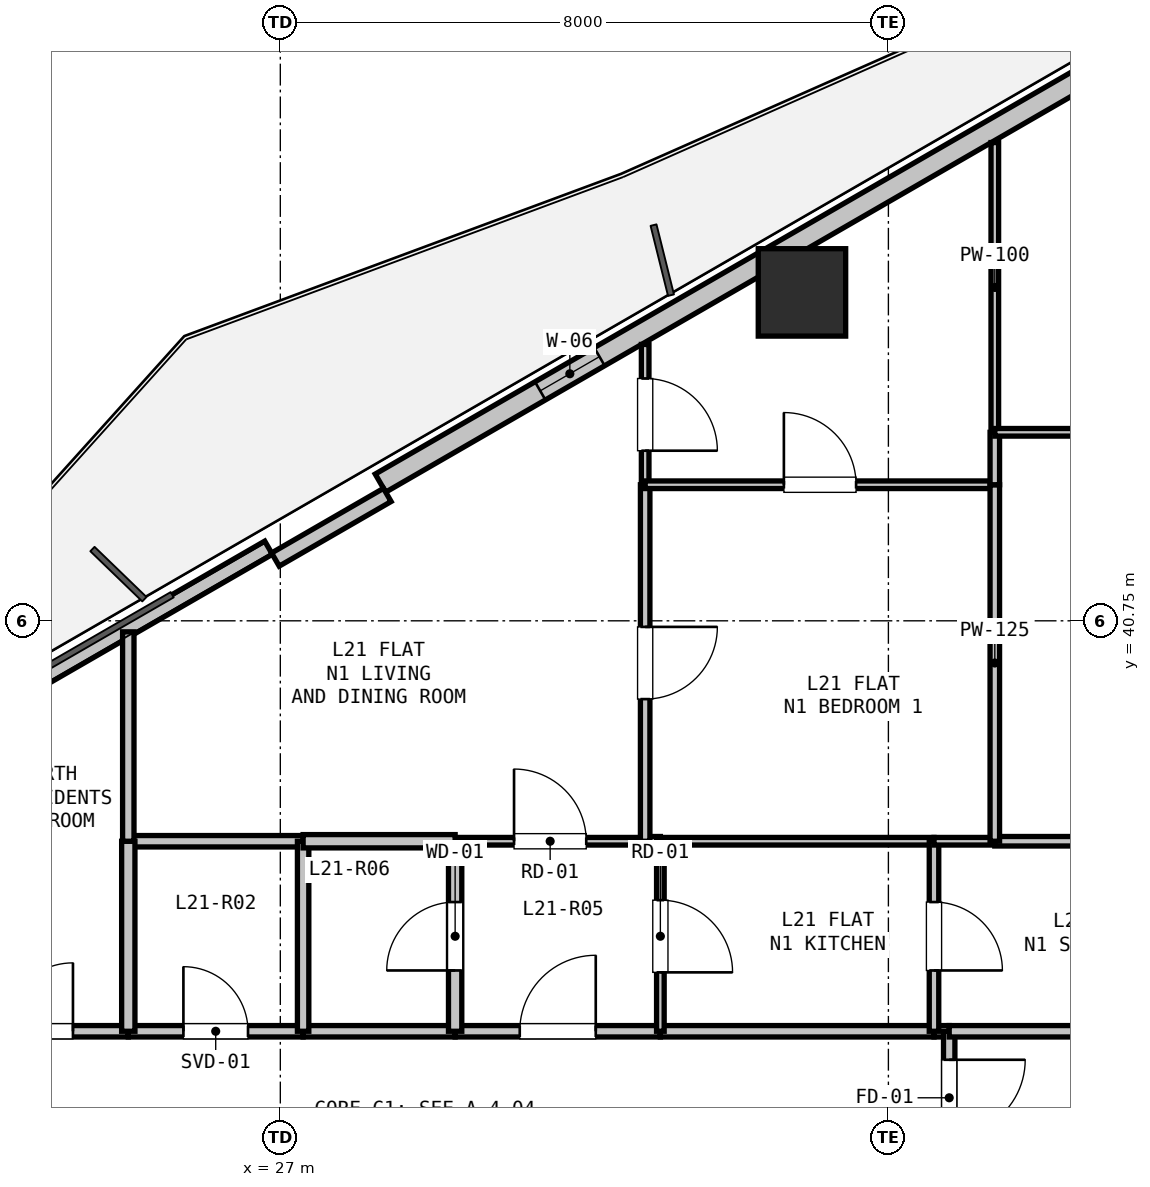
"""IFC4 building model, lengths in metres.
Left out: names, types, materials, properties, quantities, classifications, styles, units other than length and angle.
Written with IfcOpenShell. Run it as: python <this file> out.ifc"""

import sys

from ifc_helpers import new_model, si_unit, direction, frame, frame_2d, origin, origin_2d, place, context, subcontext, project, spatial, rectangle, hollow_rectangle, extrude, element, fill, save


model = new_model("IFC4")
c1 = context("Model", 3, precision=1e-05, world=origin(), true_north=direction((0.0, 1.0)))
c2 = subcontext(c1, "Body", "Model", "MODEL_VIEW")
j1 = project(units=[si_unit("LENGTHUNIT", "METRE"), si_unit("PLANEANGLEUNIT", "RADIAN")], contexts=[c1])
p1 = place(None, origin())
s1 = spatial("IfcSite", under=j1, at=p1, CompositionType="ELEMENT")
p2 = place(p1, origin())
s2 = spatial("IfcBuilding", under=s1, at=p2, CompositionType="ELEMENT")
p3 = place(p2, frame((0.0, 0.0, 80.1)))
s3 = spatial("IfcBuildingStorey", under=s2, at=p3, CompositionType="ELEMENT", Elevation=80.1)
p4 = place(p3, frame((33.863, 45.071, 0.0), z_axis=(0.0, 0.0, 1.0), x_axis=(1.0, 0.0, 0.0)))
e1 = element("IfcColumn", 1, at=p4, inside=s3, PredefinedType="COLUMN", context=c2, shape_type="SweptSolid", body=[
    extrude(hollow_rectangle(XDim=1.15, YDim=1.15, WallThickness=0.032, at=origin_2d()), origin(), (0.0, 0.0, 1.0), 3.3),
])
p5 = place(p3, frame((17.12, 36.097, 0.0), z_axis=(0.0, 0.0, 1.0), x_axis=(0.866027010039, 0.499997217876, 0.0)))
e2 = element("IfcWall", 2, at=p5, inside=s3, PredefinedType="PARAPET", context=c2, shape_type="SweptSolid", body=[
    extrude(rectangle(XDim=11.229, YDim=0.2, at=frame_2d((5.615, 0.0))), origin(), (0.0, 0.0, 1.0), 0.2),
])
p6 = place(p3, frame((28.317, 42.562, 0.0), z_axis=(0.0, 0.0, 1.0), x_axis=(0.866023023012, 0.500004123596, 0.0)))
e3 = element("IfcWall", 3, at=p6, inside=s3, PredefinedType="SOLIDWALL", context=c2, shape_type="SweptSolid", body=[
    extrude(rectangle(XDim=11.93, YDim=0.275, at=frame_2d((5.965, 0.0))), origin(), (0.0, 0.0, 1.0), 2.67),
])
p7 = place(p6, frame((2.427, 0.0, 0.9)))
e4 = element("IfcOpeningElement", 4, at=p7, cuts=e3, PredefinedType="OPENING", context=c2, shape_type="SweptSolid", body=[
    extrude(rectangle(XDim=0.9, YDim=1.4, at=frame_2d((0.45, 0.7))), frame((0.0, 0.147, 0.0), z_axis=(0.0, -1.0, 0.0), x_axis=(1.0, 0.0, 0.0)), (0.0, 0.0, 1.0), 0.295),
])
p8 = place(p3, frame((26.935, 41.556, 0.0), z_axis=(0.0, 0.0, 1.0), x_axis=(0.86605165483, 0.499954529098, 0.0)))
e5 = element("IfcWall", 5, at=p8, inside=s3, PredefinedType="PARAPET", context=c2, shape_type="SweptSolid", body=[
    extrude(rectangle(XDim=1.7, YDim=0.2, at=frame_2d((0.85, 0.0))), origin(), (0.0, 0.0, 1.0), 2.67),
])
p9 = place(p3, frame((19.8, 35.35, 0.0), z_axis=(0.0, 0.0, 1.0), x_axis=(1.0, 0.0, 0.0)))
e6 = element("IfcWall", 6, at=p9, inside=s3, PredefinedType="PARTITIONING", context=c2, shape_type="SweptSolid", body=[
    extrude(rectangle(XDim=5.2, YDim=0.15, at=frame_2d((2.6, 0.0))), origin(), (0.0, 0.0, 1.0), 3.05),
])
p10 = place(p9, frame((2.672, 0.0, 0.0)))
e7 = element("IfcOpeningElement", 7, at=p10, cuts=e6, PredefinedType="OPENING", context=c2, shape_type="SweptSolid", body=[
    extrude(rectangle(XDim=1.8, YDim=2.2, at=frame_2d((0.9, 1.1))), frame((0.0, 0.085, 0.0), z_axis=(0.0, -1.0, 0.0), x_axis=(1.0, 0.0, 0.0)), (0.0, 0.0, 1.0), 0.17),
])
p11 = place(p3, frame((25.0, 35.35, 0.0), z_axis=(0.0, 0.0, 1.0), x_axis=(1.0, 0.0, 0.0)))
e8 = element("IfcWall", 8, at=p11, inside=s3, PredefinedType="PARTITIONING", context=c2, shape_type="SweptSolid", body=[
    extrude(rectangle(XDim=2.3, YDim=0.15, at=frame_2d((1.15, 0.0))), origin(), (0.0, 0.0, 1.0), 3.05),
])
p12 = place(p11, frame((0.725, 0.0, 0.0)))
e9 = element("IfcOpeningElement", 9, at=p12, cuts=e8, PredefinedType="OPENING", context=c2, shape_type="SweptSolid", body=[
    extrude(rectangle(XDim=0.85, YDim=2.1, at=frame_2d((0.425, 1.05))), frame((0.0, 0.085, 0.0), z_axis=(0.0, -1.0, 0.0), x_axis=(1.0, 0.0, 0.0)), (0.0, 0.0, 1.0), 0.17),
])
p13 = place(p3, frame((27.3, 35.35, 0.0), z_axis=(0.0, 0.0, 1.0), x_axis=(1.0, 0.0, 0.0)))
e10 = element("IfcWall", 10, at=p13, inside=s3, PredefinedType="PARTITIONING", context=c2, shape_type="SweptSolid", body=[
    extrude(rectangle(XDim=2.0, YDim=0.15, at=frame_2d((1.0, 0.0))), origin(), (0.0, 0.0, 1.0), 3.05),
])
p14 = place(p3, frame((29.3, 35.35, 0.0), z_axis=(0.0, 0.0, 1.0), x_axis=(1.0, 0.0, 0.0)))
e11 = element("IfcWall", 11, at=p14, inside=s3, PredefinedType="PARTITIONING", context=c2, shape_type="SweptSolid", body=[
    extrude(rectangle(XDim=2.7, YDim=0.15, at=frame_2d((1.35, 0.0))), origin(), (0.0, 0.0, 1.0), 3.05),
])
p15 = place(p14, frame((0.85, 0.0, 0.0)))
e12 = element("IfcOpeningElement", 12, at=p15, cuts=e11, PredefinedType="OPENING", context=c2, shape_type="SweptSolid", body=[
    extrude(rectangle(XDim=1.0, YDim=2.15, at=frame_2d((0.5, 1.075))), frame((0.0, 0.085, 0.0), z_axis=(0.0, -1.0, 0.0), x_axis=(1.0, 0.0, 0.0)), (0.0, 0.0, 1.0), 0.17),
])
p16 = place(p3, frame((32.0, 35.35, 0.0), z_axis=(0.0, 0.0, 1.0), x_axis=(1.0, 0.0, 0.0)))
e13 = element("IfcWall", 13, at=p16, inside=s3, PredefinedType="PARTITIONING", context=c2, shape_type="SweptSolid", body=[
    extrude(rectangle(XDim=3.6, YDim=0.15, at=frame_2d((1.8, 0.0))), origin(), (0.0, 0.0, 1.0), 3.05),
])
p17 = place(p3, frame((35.6, 35.35, 0.0), z_axis=(0.0, 0.0, 1.0), x_axis=(1.0, 0.0, 0.0)))
e14 = element("IfcWall", 14, at=p17, inside=s3, PredefinedType="PARTITIONING", context=c2, shape_type="SweptSolid", body=[
    extrude(rectangle(XDim=0.2, YDim=0.15, at=frame_2d((0.1, 0.0))), origin(), (0.0, 0.0, 1.0), 3.05),
])
p18 = place(p3, frame((35.8, 35.35, 0.0), z_axis=(0.0, 0.0, 1.0), x_axis=(0.0, -1.0, 0.0)))
e15 = element("IfcWall", 15, at=p18, inside=s3, PredefinedType="PARTITIONING", context=c2, shape_type="SweptSolid", body=[
    extrude(rectangle(XDim=1.75, YDim=0.15, at=frame_2d((0.875, 0.0))), origin(), (0.0, 0.0, 1.0), 3.05),
])
p19 = place(p18, frame((0.375, 0.0, 0.0)))
e16 = element("IfcOpeningElement", 16, at=p19, cuts=e15, PredefinedType="OPENING", context=c2, shape_type="SweptSolid", body=[
    extrude(rectangle(XDim=1.0, YDim=2.15, at=frame_2d((0.5, 1.075))), frame((0.0, 0.085, 0.0), z_axis=(0.0, -1.0, 0.0), x_axis=(1.0, 0.0, 0.0)), (0.0, 0.0, 1.0), 0.17),
])
p20 = place(p3, frame((35.8, 35.35, 0.0), z_axis=(0.0, 0.0, 1.0), x_axis=(1.0, 0.0, 0.0)))
e17 = element("IfcWall", 17, at=p20, inside=s3, PredefinedType="PARTITIONING", context=c2, shape_type="SweptSolid", body=[
    extrude(rectangle(XDim=2.6, YDim=0.15, at=frame_2d((1.3, 0.0))), origin(), (0.0, 0.0, 1.0), 2.423),
])
p21 = place(p3, frame((29.3, 37.85, 0.0), z_axis=(0.0, 0.0, 1.0), x_axis=(1.0, 0.0, 0.0)))
e18 = element("IfcWall", 18, at=p21, inside=s3, PredefinedType="PARTITIONING", context=c2, shape_type="SweptSolid", body=[
    extrude(rectangle(XDim=2.5, YDim=0.1, at=frame_2d((1.25, 0.0))), origin(), (0.0, 0.0, 1.0), 3.05),
])
p22 = place(p21, frame((0.775, 0.0, 0.0)))
e19 = element("IfcOpeningElement", 19, at=p22, cuts=e18, PredefinedType="OPENING", context=c2, shape_type="SweptSolid", body=[
    extrude(rectangle(XDim=0.95, YDim=2.1, at=frame_2d((0.475, 1.05))), frame((0.0, 0.06, 0.0), z_axis=(0.0, -1.0, 0.0), x_axis=(1.0, 0.0, 0.0)), (0.0, 0.0, 1.0), 0.12),
])
p23 = place(p3, frame((31.8, 37.85, 0.0), z_axis=(0.0, 0.0, 1.0), x_axis=(1.0, 0.0, 0.0)))
e20 = element("IfcWall", 20, at=p23, inside=s3, PredefinedType="PARTITIONING", context=c2, shape_type="SweptSolid", body=[
    extrude(rectangle(XDim=0.2, YDim=0.125, at=frame_2d((0.1, 0.0))), origin(), (0.0, 0.0, 1.0), 3.05),
])
p24 = place(p3, frame((32.0, 37.85, 0.0), z_axis=(0.0, 0.0, 1.0), x_axis=(0.0, -1.0, 0.0)))
e21 = element("IfcWall", 21, at=p24, inside=s3, PredefinedType="PARTITIONING", context=c2, shape_type="SweptSolid", body=[
    extrude(rectangle(XDim=2.5, YDim=0.1, at=frame_2d((1.25, 0.0))), origin(), (0.0, 0.0, 1.0), 3.05),
])
p25 = place(p24, frame((0.775, 0.0, 0.0)))
e22 = element("IfcOpeningElement", 22, at=p25, cuts=e21, PredefinedType="OPENING", context=c2, shape_type="SweptSolid", body=[
    extrude(rectangle(XDim=0.95, YDim=2.1, at=frame_2d((0.475, 1.05))), frame((0.0, 0.06, 0.0), z_axis=(0.0, -1.0, 0.0), x_axis=(1.0, 0.0, 0.0)), (0.0, 0.0, 1.0), 0.12),
])
p26 = place(p3, frame((29.3, 35.35, 0.0), z_axis=(0.0, 0.0, 1.0), x_axis=(0.0, 1.0, 0.0)))
e23 = element("IfcWall", 23, at=p26, inside=s3, PredefinedType="PLUMBINGWALL", context=c2, shape_type="SweptSolid", body=[
    extrude(rectangle(XDim=2.5, YDim=0.175, at=frame_2d((1.25, 0.0))), origin(), (0.0, 0.0, 1.0), 3.05),
])
p27 = place(p26, frame((0.8, 0.0, 0.0)))
e24 = element("IfcOpeningElement", 24, at=p27, cuts=e23, PredefinedType="OPENING", context=c2, shape_type="SweptSolid", body=[
    extrude(rectangle(XDim=0.9, YDim=2.1, at=frame_2d((0.45, 1.05))), frame((0.0, 0.097, 0.0), z_axis=(0.0, -1.0, 0.0), x_axis=(1.0, 0.0, 0.0)), (0.0, 0.0, 1.0), 0.195),
])
p28 = place(p3, frame((25.0, 37.85, 0.0), z_axis=(0.0, 0.0, 1.0), x_axis=(1.0, 0.0, 0.0)))
e25 = element("IfcWall", 25, at=p28, inside=s3, PredefinedType="PARTITIONING", context=c2, shape_type="SweptSolid", body=[
    extrude(rectangle(XDim=2.3, YDim=0.15, at=frame_2d((1.15, 0.0))), origin(), (0.0, 0.0, 1.0), 3.05),
])
p29 = place(p3, frame((27.3, 37.85, 0.0), z_axis=(0.0, 0.0, 1.0), x_axis=(0.0, -1.0, 0.0)))
e26 = element("IfcWall", 26, at=p29, inside=s3, PredefinedType="PARTITIONING", context=c2, shape_type="SweptSolid", body=[
    extrude(rectangle(XDim=2.5, YDim=0.15, at=frame_2d((1.25, 0.0))), origin(), (0.0, 0.0, 1.0), 3.05),
])
p30 = place(p3, frame((25.0, 35.35, 0.0), z_axis=(0.0, 0.0, 1.0), x_axis=(0.0, 1.0, 0.0)))
e27 = element("IfcWall", 27, at=p30, inside=s3, PredefinedType="PLUMBINGWALL", context=c2, shape_type="SweptSolid", body=[
    extrude(rectangle(XDim=2.5, YDim=0.175, at=frame_2d((1.25, 0.0))), origin(), (0.0, 0.0, 1.0), 3.05),
])
p31 = place(p3, frame((27.3, 37.85, 0.0), z_axis=(0.0, 0.0, 1.0), x_axis=(1.0, 0.0, 0.0)))
e28 = element("IfcWall", 28, at=p31, inside=s3, PredefinedType="PLUMBINGWALL", context=c2, shape_type="SweptSolid", body=[
    extrude(rectangle(XDim=2.0, YDim=0.175, at=frame_2d((1.0, 0.0))), origin(), (0.0, 0.0, 1.0), 3.05),
])
p32 = place(p3, frame((32.0, 37.85, 0.0), z_axis=(0.0, 0.0, 1.0), x_axis=(1.0, 0.0, 0.0)))
e29 = element("IfcWall", 29, at=p32, inside=s3, PredefinedType="PARTITIONING", context=c2, shape_type="SweptSolid", body=[
    extrude(rectangle(XDim=3.6, YDim=0.1, at=frame_2d((1.8, 0.0))), origin(), (0.0, 0.0, 1.0), 3.05),
])
p33 = place(p3, frame((35.6, 37.85, 0.0), z_axis=(0.0, 0.0, 1.0), x_axis=(0.0, -1.0, 0.0)))
e30 = element("IfcWall", 30, at=p33, inside=s3, PredefinedType="PARTITIONING", context=c2, shape_type="SweptSolid", body=[
    extrude(rectangle(XDim=2.5, YDim=0.125, at=frame_2d((1.25, 0.0))), origin(), (0.0, 0.0, 1.0), 3.05),
])
p34 = place(p33, frame((0.8, 0.0, 0.0)))
e31 = element("IfcOpeningElement", 31, at=p34, cuts=e30, PredefinedType="OPENING", context=c2, shape_type="SweptSolid", body=[
    extrude(rectangle(XDim=0.9, YDim=2.1, at=frame_2d((0.45, 1.05))), frame((0.0, 0.073, 0.0), z_axis=(0.0, -1.0, 0.0), x_axis=(1.0, 0.0, 0.0)), (0.0, 0.0, 1.0), 0.145),
])
p35 = place(p3, frame((25.0, 40.605, 0.0), z_axis=(0.0, 0.0, 1.0), x_axis=(0.0, -1.0, 0.0)))
e32 = element("IfcWall", 32, at=p35, inside=s3, PredefinedType="PARTITIONING", context=c2, shape_type="SweptSolid", body=[
    extrude(rectangle(XDim=2.755, YDim=0.15, at=frame_2d((1.377, 0.0))), origin(), (0.0, 0.0, 1.0), 2.365),
])
p36 = place(p3, frame((35.6, 37.85, 0.0), z_axis=(0.0, 0.0, 1.0), x_axis=(1.0, 0.0, 0.0)))
e33 = element("IfcWall", 33, at=p36, inside=s3, PredefinedType="PARTITIONING", context=c2, shape_type="SweptSolid", body=[
    extrude(rectangle(XDim=0.8, YDim=0.1, at=frame_2d((0.4, 0.0))), origin(), (0.0, 0.0, 1.0), 3.05),
])
p37 = place(p3, frame((36.4, 37.85, 0.0), z_axis=(0.0, 0.0, 1.0), x_axis=(1.0, 0.0, 0.0)))
e34 = element("IfcWall", 34, at=p37, inside=s3, PredefinedType="PARTITIONING", context=c2, shape_type="SweptSolid", body=[
    extrude(rectangle(XDim=6.473, YDim=0.125, at=frame_2d((3.237, 0.0))), origin(), (0.0, 0.0, 1.0), 2.365),
])
p38 = place(p37, frame((2.762, 0.0, 0.0)))
e35 = element("IfcOpeningElement", 35, at=p38, cuts=e34, PredefinedType="OPENING", context=c2, shape_type="SweptSolid", body=[
    extrude(rectangle(XDim=0.95, YDim=2.1, at=frame_2d((0.475, 1.05))), frame((0.0, 0.073, 0.0), z_axis=(0.0, -1.0, 0.0), x_axis=(1.0, 0.0, 0.0)), (0.0, 0.0, 1.0), 0.145),
])
p39 = place(p3, frame((31.8, 44.386, 0.0), z_axis=(0.0, 0.0, 1.0), x_axis=(0.0, -1.0, 0.0)))
e36 = element("IfcWall", 36, at=p39, inside=s3, PredefinedType="PARTITIONING", context=c2, shape_type="SweptSolid", body=[
    extrude(rectangle(XDim=1.846, YDim=0.1, at=frame_2d((0.923, 0.0))), origin(), (0.0, 0.0, 1.0), 2.365),
])
p40 = place(p39, frame((0.448, 0.0, 0.0)))
e37 = element("IfcOpeningElement", 37, at=p40, cuts=e36, PredefinedType="OPENING", context=c2, shape_type="SweptSolid", body=[
    extrude(rectangle(XDim=0.95, YDim=2.1, at=frame_2d((0.475, 1.05))), frame((0.0, 0.06, 0.0), z_axis=(0.0, -1.0, 0.0), x_axis=(1.0, 0.0, 0.0)), (0.0, 0.0, 1.0), 0.12),
])
p41 = place(p3, frame((31.8, 42.54, 0.0), z_axis=(0.0, 0.0, 1.0), x_axis=(0.0, -1.0, 0.0)))
e38 = element("IfcWall", 38, at=p41, inside=s3, PredefinedType="PARTITIONING", context=c2, shape_type="SweptSolid", body=[
    extrude(rectangle(XDim=4.69, YDim=0.125, at=frame_2d((2.345, 0.0))), origin(), (0.0, 0.0, 1.0), 3.05),
])
p42 = place(p41, frame((1.87, 0.0, 0.0)))
e39 = element("IfcOpeningElement", 39, at=p42, cuts=e38, PredefinedType="OPENING", context=c2, shape_type="SweptSolid", body=[
    extrude(rectangle(XDim=0.95, YDim=2.1, at=frame_2d((0.475, 1.05))), frame((0.0, 0.073, 0.0), z_axis=(0.0, -1.0, 0.0), x_axis=(1.0, 0.0, 0.0)), (0.0, 0.0, 1.0), 0.145),
])
p43 = place(p3, frame((31.8, 42.54, 0.0), z_axis=(0.0, 0.0, 1.0), x_axis=(1.0, 0.0, 0.0)))
e40 = element("IfcWall", 40, at=p43, inside=s3, PredefinedType="PARTITIONING", context=c2, shape_type="SweptSolid", body=[
    extrude(rectangle(XDim=4.6, YDim=0.1, at=frame_2d((2.3, 0.0))), origin(), (0.0, 0.0, 1.0), 3.05),
])
p44 = place(p43, frame((1.825, 0.0, 0.0)))
e41 = element("IfcOpeningElement", 41, at=p44, cuts=e40, PredefinedType="OPENING", context=c2, shape_type="SweptSolid", body=[
    extrude(rectangle(XDim=0.95, YDim=2.1, at=frame_2d((0.475, 1.05))), frame((0.0, 0.06, 0.0), z_axis=(0.0, -1.0, 0.0), x_axis=(1.0, 0.0, 0.0)), (0.0, 0.0, 1.0), 0.12),
])
p45 = place(p3, frame((36.4, 42.54, 0.0), z_axis=(0.0, 0.0, 1.0), x_axis=(0.0, -1.0, 0.0)))
e42 = element("IfcWall", 42, at=p45, inside=s3, PredefinedType="PARTITIONING", context=c2, shape_type="SweptSolid", body=[
    extrude(rectangle(XDim=4.69, YDim=0.125, at=frame_2d((2.345, 0.0))), origin(), (0.0, 0.0, 1.0), 3.05),
])
p46 = place(p3, frame((36.4, 47.042, 0.0), z_axis=(0.0, 0.0, 1.0), x_axis=(0.0, -1.0, 0.0)))
e43 = element("IfcWall", 43, at=p46, inside=s3, PredefinedType="PARTITIONING", context=c2, shape_type="SweptSolid", body=[
    extrude(rectangle(XDim=3.812, YDim=0.1, at=frame_2d((1.906, 0.0))), origin(), (0.0, 0.0, 1.0), 2.66),
])
p47 = place(p3, frame((36.4, 43.23, 0.0), z_axis=(0.0, 0.0, 1.0), x_axis=(0.0, -1.0, 0.0)))
e44 = element("IfcWall", 44, at=p47, inside=s3, PredefinedType="PARTITIONING", context=c2, shape_type="SweptSolid", body=[
    extrude(rectangle(XDim=0.69, YDim=0.125, at=frame_2d((0.345, 0.0))), origin(), (0.0, 0.0, 1.0), 3.05),
])
p48 = place(p3, frame((36.4, 43.23, 0.0), z_axis=(0.0, 0.0, 1.0), x_axis=(1.0, 0.0, 0.0)))
e45 = element("IfcWall", 45, at=p48, inside=s3, PredefinedType="PARTITIONING", context=c2, shape_type="SweptSolid", body=[
    extrude(rectangle(XDim=6.473, YDim=0.1, at=frame_2d((3.237, 0.0))), origin(), (0.0, 0.0, 1.0), 2.423),
])
p49 = place(p48, frame((2.762, 0.0, 0.0)))
e46 = element("IfcOpeningElement", 46, at=p49, cuts=e45, PredefinedType="OPENING", context=c2, shape_type="SweptSolid", body=[
    extrude(rectangle(XDim=0.95, YDim=2.1, at=frame_2d((0.475, 1.05))), frame((0.0, 0.06, 0.0), z_axis=(0.0, -1.0, 0.0), x_axis=(1.0, 0.0, 0.0)), (0.0, 0.0, 1.0), 0.12),
])
p50 = place(p7, origin())
e47 = element("IfcWindow", 47, at=p50, inside=s3, PartitioningType="SINGLE_PANEL", PredefinedType="WINDOW", context=c2, shape_type="SweptSolid", body=[
    extrude(rectangle(XDim=0.9, YDim=1.4, at=frame_2d((0.45, 0.7))), frame((0.0, 0.03, 0.0), z_axis=(0.0, -1.0, 0.0), x_axis=(1.0, 0.0, 0.0)), (0.0, 0.0, 1.0), 0.06),
])
fill(e4, e47)
p51 = place(p19, origin())
e48 = element("IfcDoor", 48, at=p51, inside=s3, OperationType="SINGLE_SWING_LEFT", PredefinedType="DOOR", context=c2, shape_type="SweptSolid", body=[
    extrude(rectangle(XDim=1.0, YDim=2.15, at=frame_2d((0.5, 1.075))), frame((0.0, 0.025, 0.0), z_axis=(0.0, -1.0, 0.0), x_axis=(1.0, 0.0, 0.0)), (0.0, 0.0, 1.0), 0.05),
])
fill(e16, e48)
p52 = place(p15, origin())
e49 = element("IfcDoor", 49, at=p52, inside=s3, OperationType="SINGLE_SWING_RIGHT", PredefinedType="DOOR", context=c2, shape_type="SweptSolid", body=[
    extrude(rectangle(XDim=1.0, YDim=2.15, at=frame_2d((0.5, 1.075))), frame((0.0, 0.025, 0.0), z_axis=(0.0, -1.0, 0.0), x_axis=(1.0, 0.0, 0.0)), (0.0, 0.0, 1.0), 0.05),
])
fill(e12, e49)
p53 = place(p12, origin())
e50 = element("IfcDoor", 50, at=p53, inside=s3, OperationType="SINGLE_SWING_LEFT", PredefinedType="DOOR", context=c2, shape_type="SweptSolid", body=[
    extrude(rectangle(XDim=0.85, YDim=2.1, at=frame_2d((0.425, 1.05))), frame((0.0, 0.025, 0.0), z_axis=(0.0, -1.0, 0.0), x_axis=(1.0, 0.0, 0.0)), (0.0, 0.0, 1.0), 0.05),
])
fill(e9, e50)
p54 = place(p10, origin())
e51 = element("IfcDoor", 51, at=p54, inside=s3, OperationType="DOUBLE_DOOR_SINGLE_SWING", PredefinedType="DOOR", context=c2, shape_type="SweptSolid", body=[
    extrude(rectangle(XDim=1.8, YDim=2.2, at=frame_2d((0.9, 1.1))), frame((0.0, 0.025, 0.0), z_axis=(0.0, -1.0, 0.0), x_axis=(1.0, 0.0, 0.0)), (0.0, 0.0, 1.0), 0.05),
])
fill(e7, e51)
p55 = place(p27, origin())
e52 = element("IfcDoor", 52, at=p55, inside=s3, OperationType="SINGLE_SWING_LEFT", PredefinedType="DOOR", context=c2, shape_type="SweptSolid", body=[
    extrude(rectangle(XDim=0.9, YDim=2.1, at=frame_2d((0.45, 1.05))), frame((0.0, 0.025, 0.0), z_axis=(0.0, -1.0, 0.0), x_axis=(1.0, 0.0, 0.0)), (0.0, 0.0, 1.0), 0.05),
])
fill(e24, e52)
p56 = place(p25, origin())
e53 = element("IfcDoor", 53, at=p56, inside=s3, OperationType="SINGLE_SWING_RIGHT", PredefinedType="DOOR", context=c2, shape_type="SweptSolid", body=[
    extrude(rectangle(XDim=0.95, YDim=2.1, at=frame_2d((0.475, 1.05))), frame((0.0, 0.025, 0.0), z_axis=(0.0, -1.0, 0.0), x_axis=(1.0, 0.0, 0.0)), (0.0, 0.0, 1.0), 0.05),
])
fill(e22, e53)
p57 = place(p22, origin())
e54 = element("IfcDoor", 54, at=p57, inside=s3, OperationType="SINGLE_SWING_LEFT", PredefinedType="DOOR", context=c2, shape_type="SweptSolid", body=[
    extrude(rectangle(XDim=0.95, YDim=2.1, at=frame_2d((0.475, 1.05))), frame((0.0, 0.025, 0.0), z_axis=(0.0, -1.0, 0.0), x_axis=(1.0, 0.0, 0.0)), (0.0, 0.0, 1.0), 0.05),
])
fill(e19, e54)
p58 = place(p42, origin())
e55 = element("IfcDoor", 55, at=p58, inside=s3, OperationType="SINGLE_SWING_LEFT", PredefinedType="DOOR", context=c2, shape_type="SweptSolid", body=[
    extrude(rectangle(XDim=0.95, YDim=2.1, at=frame_2d((0.475, 1.05))), frame((0.0, 0.025, 0.0), z_axis=(0.0, -1.0, 0.0), x_axis=(1.0, 0.0, 0.0)), (0.0, 0.0, 1.0), 0.05),
])
fill(e39, e55)
p59 = place(p40, origin())
e56 = element("IfcDoor", 56, at=p59, inside=s3, OperationType="SINGLE_SWING_RIGHT", PredefinedType="DOOR", context=c2, shape_type="SweptSolid", body=[
    extrude(rectangle(XDim=0.95, YDim=2.1, at=frame_2d((0.475, 1.05))), frame((0.0, 0.025, 0.0), z_axis=(0.0, -1.0, 0.0), x_axis=(1.0, 0.0, 0.0)), (0.0, 0.0, 1.0), 0.05),
])
fill(e37, e56)
p60 = place(p44, origin())
e57 = element("IfcDoor", 57, at=p60, inside=s3, OperationType="SINGLE_SWING_LEFT", PredefinedType="DOOR", context=c2, shape_type="SweptSolid", body=[
    extrude(rectangle(XDim=0.95, YDim=2.1, at=frame_2d((0.475, 1.05))), frame((0.0, 0.025, 0.0), z_axis=(0.0, -1.0, 0.0), x_axis=(1.0, 0.0, 0.0)), (0.0, 0.0, 1.0), 0.05),
])
fill(e41, e57)
p61 = place(p34, origin())
e58 = element("IfcDoor", 58, at=p61, inside=s3, OperationType="SINGLE_SWING_RIGHT", PredefinedType="DOOR", context=c2, shape_type="SweptSolid", body=[
    extrude(rectangle(XDim=0.9, YDim=2.1, at=frame_2d((0.45, 1.05))), frame((0.0, 0.025, 0.0), z_axis=(0.0, -1.0, 0.0), x_axis=(1.0, 0.0, 0.0)), (0.0, 0.0, 1.0), 0.05),
])
fill(e31, e58)
save(model, sys.argv[1])
